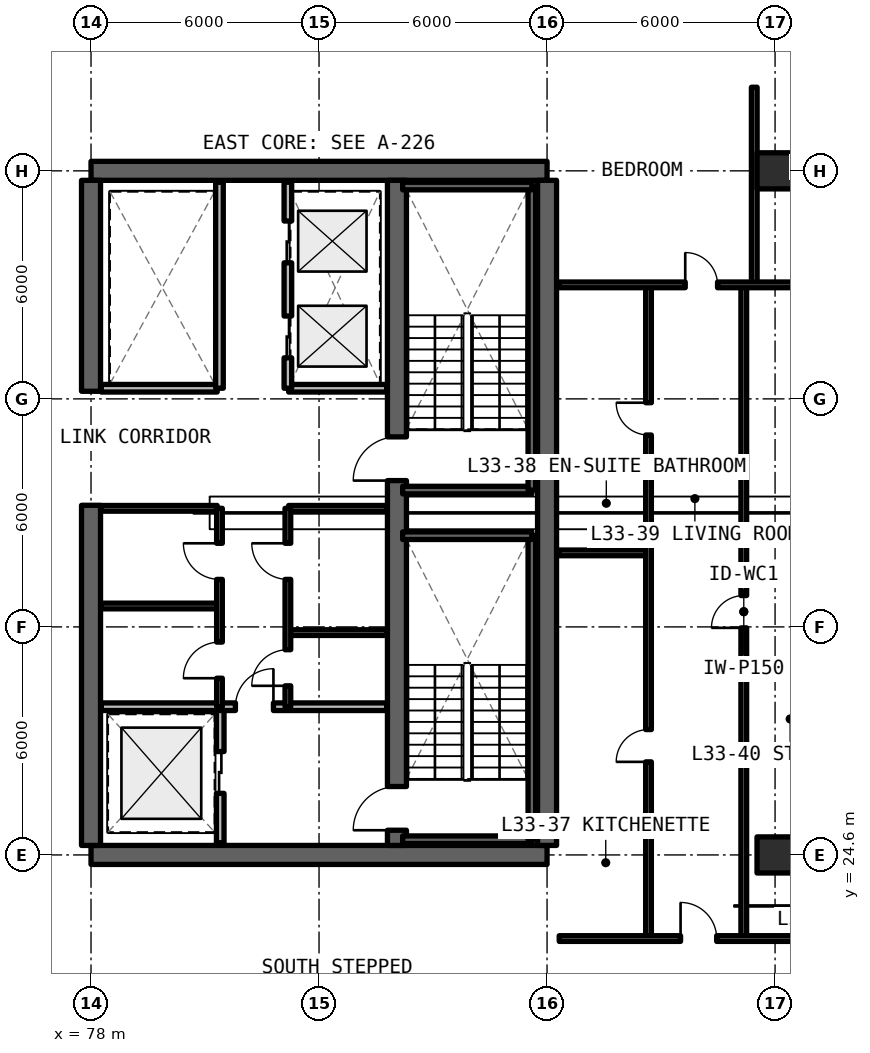
"""IFC4 building model, lengths in metres.
Left out: names, types, materials, properties, quantities, classifications, styles, units other than length and angle.
Written with IfcOpenShell. Run it as: python <this file> out.ifc"""

import sys

from ifc_helpers import new_model, si_unit, direction, frame, frame_2d, origin, origin_2d, place, context, subcontext, project, spatial, rectangle, extrude, element, fill, save


model = new_model("IFC4")
c1 = context("Model", 3, precision=1e-05, world=origin(), true_north=direction((0.0, 1.0)))
c2 = subcontext(c1, "Body", "Model", "MODEL_VIEW")
j1 = project(units=[si_unit("LENGTHUNIT", "METRE"), si_unit("PLANEANGLEUNIT", "RADIAN")], contexts=[c1])
p1 = place(None, origin())
s1 = spatial("IfcSite", under=j1, at=p1, CompositionType="ELEMENT")
p2 = place(p1, origin())
s2 = spatial("IfcBuilding", under=s1, at=p2, CompositionType="ELEMENT")
p3 = place(p2, frame((0.0, 0.0, 119.46)))
s3 = spatial("IfcBuildingStorey", under=s2, at=p3, CompositionType="ELEMENT", Elevation=119.46)
for number, where, z_axis, x_axis in (
    (1, (78.0, 24.6, 0.0), (0.0, 0.0, 1.0), (1.0, 0.0, 0.0)),
    (2, (90.0, 42.6, 0.0), (0.0, 0.0, 1.0), (-1.0, 0.0, 0.0)),
):
    element("IfcWall", number, at=place(p3, frame(where, z_axis=z_axis, x_axis=x_axis)), inside=s3, PredefinedType="SHEAR", context=c2, shape_type="SweptSolid", body=[
        extrude(rectangle(XDim=12.0, YDim=0.5, at=frame_2d((6.0, 0.0))), origin(), (0.0, 0.0, 1.0), 3.63),
    ])
p4 = place(p3, frame((90.0, 24.85, 0.0), z_axis=(0.0, 0.0, 1.0), x_axis=(0.0, 1.0, 0.0)))
e3 = element("IfcWall", 3, at=p4, inside=s3, PredefinedType="SHEAR", context=c2, shape_type="SweptSolid", body=[
    extrude(rectangle(XDim=17.5, YDim=0.5, at=frame_2d((8.75, 0.0))), origin(), (0.0, 0.0, 1.0), 3.63),
])
p5 = place(p3, frame((78.0, 24.85, 0.0), z_axis=(0.0, 0.0, 1.0), x_axis=(0.0, 1.0, 0.0)))
e4 = element("IfcWall", 4, at=p5, inside=s3, PredefinedType="SHEAR", context=c2, shape_type="SweptSolid", body=[
    extrude(rectangle(XDim=8.95, YDim=0.5, at=frame_2d((4.475, 0.0))), origin(), (0.0, 0.0, 1.0), 3.63),
])
p6 = place(p3, frame((78.0, 36.8, 0.0), z_axis=(0.0, 0.0, 1.0), x_axis=(0.0, 1.0, 0.0)))
e5 = element("IfcWall", 5, at=p6, inside=s3, PredefinedType="SHEAR", context=c2, shape_type="SweptSolid", body=[
    extrude(rectangle(XDim=5.55, YDim=0.5, at=frame_2d((2.775, 0.0))), origin(), (0.0, 0.0, 1.0), 3.63),
])
p7 = place(p3, frame((86.05, 24.85, 0.0), z_axis=(0.0, 0.0, 1.0), x_axis=(0.0, 1.0, 0.0)))
e6 = element("IfcWall", 6, at=p7, inside=s3, PredefinedType="SHEAR", context=c2, shape_type="SweptSolid", body=[
    extrude(rectangle(XDim=17.5, YDim=0.5, at=frame_2d((8.75, 0.0))), origin(), (0.0, 0.0, 1.0), 3.63),
])
p8 = place(p7, frame((0.4, 0.0, 0.0)))
e7 = element("IfcOpeningElement", 7, at=p8, cuts=e6, PredefinedType="OPENING", context=c2, shape_type="SweptSolid", body=[
    extrude(rectangle(XDim=1.15, YDim=2.15, at=frame_2d((0.575, 1.075))), frame((0.0, 0.26, 0.0), z_axis=(0.0, -1.0, 0.0), x_axis=(1.0, 0.0, 0.0)), (0.0, 0.0, 1.0), 0.52),
])
p9 = place(p7, frame((9.6, 0.0, 0.0)))
e8 = element("IfcOpeningElement", 8, at=p9, cuts=e6, PredefinedType="OPENING", context=c2, shape_type="SweptSolid", body=[
    extrude(rectangle(XDim=1.15, YDim=2.15, at=frame_2d((0.575, 1.075))), frame((0.0, 0.26, 0.0), z_axis=(0.0, -1.0, 0.0), x_axis=(1.0, 0.0, 0.0)), (0.0, 0.0, 1.0), 0.52),
])
for number, where, z_axis, x_axis in (
    (9, (96.0, 24.6, 0.0), (0.0, 0.0, 1.0), (1.0, 0.0, 0.0)),
    (10, (96.0, 42.6, 0.0), (0.0, 0.0, 1.0), (1.0, 0.0, 0.0)),
):
    element("IfcColumn", number, at=place(p3, frame(where, z_axis=z_axis, x_axis=x_axis)), inside=s3, PredefinedType="COLUMN", context=c2, shape_type="SweptSolid", body=[
        extrude(rectangle(XDim=0.95, YDim=0.95, at=origin_2d()), origin(), (0.0, 0.0, 1.0), 3.63),
    ])
p10 = place(p3, frame((81.4, 24.92, 0.0), z_axis=(0.0, 0.0, 1.0), x_axis=(0.0, 1.0, 0.0)))
e11 = element("IfcWall", 11, at=p10, inside=s3, PredefinedType="SOLIDWALL", context=c2, shape_type="SweptSolid", body=[
    extrude(rectangle(XDim=3.58, YDim=0.2, at=frame_2d((1.79, 0.0))), origin(), (0.0, 0.0, 1.0), 2.57),
])
p11 = place(p10, frame((1.3, 0.0, 0.0)))
e12 = element("IfcOpeningElement", 12, at=p11, cuts=e11, PredefinedType="OPENING", context=c2, shape_type="SweptSolid", body=[
    extrude(rectangle(XDim=1.1, YDim=2.2, at=frame_2d((0.55, 1.1))), frame((0.0, 0.11, 0.0), z_axis=(0.0, -1.0, 0.0), x_axis=(1.0, 0.0, 0.0)), (0.0, 0.0, 1.0), 0.22),
])
p12 = place(p3, frame((78.27, 28.5, 0.0), z_axis=(0.0, 0.0, 1.0), x_axis=(1.0, 0.0, 0.0)))
e13 = element("IfcWall", 13, at=p12, inside=s3, PredefinedType="SOLIDWALL", context=c2, shape_type="SweptSolid", body=[
    extrude(rectangle(XDim=7.51, YDim=0.2, at=frame_2d((3.755, 0.0))), origin(), (0.0, 0.0, 1.0), 2.57),
])
p13 = place(p12, frame((3.53, 0.0, 0.0)))
e14 = element("IfcOpeningElement", 14, at=p13, cuts=e13, PredefinedType="OPENING", context=c2, shape_type="SweptSolid", body=[
    extrude(rectangle(XDim=1.0, YDim=2.15, at=frame_2d((0.5, 1.075))), frame((0.0, 0.11, 0.0), z_axis=(0.0, -1.0, 0.0), x_axis=(1.0, 0.0, 0.0)), (0.0, 0.0, 1.0), 0.22),
])
for number, where, z_axis, x_axis in (
    (15, (83.2, 30.45, 0.0), (0.0, 0.0, 1.0), (1.0, 0.0, 0.0)),
    (16, (83.2, 33.72, 0.0), (0.0, 0.0, 1.0), (1.0, 0.0, 0.0)),
):
    element("IfcWall", number, at=place(p3, frame(where, z_axis=z_axis, x_axis=x_axis)), inside=s3, PredefinedType="SOLIDWALL", context=c2, shape_type="SweptSolid", body=[
        extrude(rectangle(XDim=2.58, YDim=0.15, at=frame_2d((1.29, 0.0))), origin(), (0.0, 0.0, 1.0), 2.57),
    ])
p14 = place(p3, frame((83.18, 28.5, 0.0), z_axis=(0.0, 0.0, 1.0), x_axis=(0.0, 1.0, 0.0)))
e17 = element("IfcWall", 17, at=p14, inside=s3, PredefinedType="SOLIDWALL", context=c2, shape_type="SweptSolid", body=[
    extrude(rectangle(XDim=5.22, YDim=0.15, at=frame_2d((2.61, 0.0))), origin(), (0.0, 0.0, 1.0), 2.57),
])
p15 = place(p14, frame((0.55, 0.0, 0.0)))
e18 = element("IfcOpeningElement", 18, at=p15, cuts=e17, PredefinedType="OPENING", context=c2, shape_type="SweptSolid", body=[
    extrude(rectangle(XDim=0.95, YDim=2.15, at=frame_2d((0.475, 1.075))), frame((0.0, 0.085, 0.0), z_axis=(0.0, -1.0, 0.0), x_axis=(1.0, 0.0, 0.0)), (0.0, 0.0, 1.0), 0.17),
])
p16 = place(p14, frame((3.35, 0.0, 0.0)))
e19 = element("IfcOpeningElement", 19, at=p16, cuts=e17, PredefinedType="OPENING", context=c2, shape_type="SweptSolid", body=[
    extrude(rectangle(XDim=0.95, YDim=2.15, at=frame_2d((0.475, 1.075))), frame((0.0, 0.085, 0.0), z_axis=(0.0, -1.0, 0.0), x_axis=(1.0, 0.0, 0.0)), (0.0, 0.0, 1.0), 0.17),
])
for number, where, z_axis, x_axis in (
    (20, (78.27, 31.15, 0.0), (0.0, 0.0, 1.0), (1.0, 0.0, 0.0)),
    (21, (78.27, 33.72, 0.0), (0.0, 0.0, 1.0), (1.0, 0.0, 0.0)),
):
    element("IfcWall", number, at=place(p3, frame(where, z_axis=z_axis, x_axis=x_axis)), inside=s3, PredefinedType="SOLIDWALL", context=c2, shape_type="SweptSolid", body=[
        extrude(rectangle(XDim=3.05, YDim=0.15, at=frame_2d((1.525, 0.0))), origin(), (0.0, 0.0, 1.0), 2.57),
    ])
p17 = place(p3, frame((81.38, 28.5, 0.0), z_axis=(0.0, 0.0, 1.0), x_axis=(0.0, 1.0, 0.0)))
e22 = element("IfcWall", 22, at=p17, inside=s3, PredefinedType="SOLIDWALL", context=c2, shape_type="SweptSolid", body=[
    extrude(rectangle(XDim=5.22, YDim=0.15, at=frame_2d((2.61, 0.0))), origin(), (0.0, 0.0, 1.0), 2.57),
])
p18 = place(p17, frame((0.75, 0.0, 0.0)))
e23 = element("IfcOpeningElement", 23, at=p18, cuts=e22, PredefinedType="OPENING", context=c2, shape_type="SweptSolid", body=[
    extrude(rectangle(XDim=0.95, YDim=2.15, at=frame_2d((0.475, 1.075))), frame((0.0, 0.085, 0.0), z_axis=(0.0, -1.0, 0.0), x_axis=(1.0, 0.0, 0.0)), (0.0, 0.0, 1.0), 0.17),
])
p19 = place(p17, frame((3.35, 0.0, 0.0)))
e24 = element("IfcOpeningElement", 24, at=p19, cuts=e22, PredefinedType="OPENING", context=c2, shape_type="SweptSolid", body=[
    extrude(rectangle(XDim=0.95, YDim=2.15, at=frame_2d((0.475, 1.075))), frame((0.0, 0.085, 0.0), z_axis=(0.0, -1.0, 0.0), x_axis=(1.0, 0.0, 0.0)), (0.0, 0.0, 1.0), 0.17),
])
p20 = place(p3, frame((83.2, 36.88, 0.0), z_axis=(0.0, 0.0, 1.0), x_axis=(1.0, 0.0, 0.0)))
e25 = element("IfcWall", 25, at=p20, inside=s3, PredefinedType="SOLIDWALL", context=c2, shape_type="SweptSolid", body=[
    extrude(rectangle(XDim=2.58, YDim=0.2, at=frame_2d((1.29, 0.0))), origin(), (0.0, 0.0, 1.0), 2.57),
])
p21 = place(p3, frame((83.18, 36.88, 0.0), z_axis=(0.0, 0.0, 1.0), x_axis=(0.0, 1.0, 0.0)))
e26 = element("IfcWall", 26, at=p21, inside=s3, PredefinedType="SOLIDWALL", context=c2, shape_type="SweptSolid", body=[
    extrude(rectangle(XDim=5.42, YDim=0.2, at=frame_2d((2.71, 0.0))), origin(), (0.0, 0.0, 1.0), 2.57),
])
p22 = place(p21, frame((0.8, 0.0, 0.0)))
e27 = element("IfcOpeningElement", 27, at=p22, cuts=e26, PredefinedType="OPENING", context=c2, shape_type="SweptSolid", body=[
    extrude(rectangle(XDim=1.1, YDim=2.2, at=frame_2d((0.55, 1.1))), frame((0.0, 0.11, 0.0), z_axis=(0.0, -1.0, 0.0), x_axis=(1.0, 0.0, 0.0)), (0.0, 0.0, 1.0), 0.22),
])
p23 = place(p21, frame((3.3, 0.0, 0.0)))
e28 = element("IfcOpeningElement", 28, at=p23, cuts=e26, PredefinedType="OPENING", context=c2, shape_type="SweptSolid", body=[
    extrude(rectangle(XDim=1.1, YDim=2.2, at=frame_2d((0.55, 1.1))), frame((0.0, 0.11, 0.0), z_axis=(0.0, -1.0, 0.0), x_axis=(1.0, 0.0, 0.0)), (0.0, 0.0, 1.0), 0.22),
])
p24 = place(p3, frame((78.27, 36.88, 0.0), z_axis=(0.0, 0.0, 1.0), x_axis=(1.0, 0.0, 0.0)))
e29 = element("IfcWall", 29, at=p24, inside=s3, PredefinedType="SOLIDWALL", context=c2, shape_type="SweptSolid", body=[
    extrude(rectangle(XDim=3.05, YDim=0.2, at=frame_2d((1.525, 0.0))), origin(), (0.0, 0.0, 1.0), 2.57),
])
p25 = place(p3, frame((81.38, 36.88, 0.0), z_axis=(0.0, 0.0, 1.0), x_axis=(0.0, 1.0, 0.0)))
e30 = element("IfcWall", 30, at=p25, inside=s3, PredefinedType="SOLIDWALL", context=c2, shape_type="SweptSolid", body=[
    extrude(rectangle(XDim=5.42, YDim=0.2, at=frame_2d((2.71, 0.0))), origin(), (0.0, 0.0, 1.0), 2.57),
])
p26 = place(p3, frame((95.177, 22.4, 0.0), z_axis=(0.0, 0.0, 1.0), x_axis=(0.0, 1.0, 0.0)))
e31 = element("IfcWall", 31, at=p26, inside=s3, PredefinedType="PARTITIONING", context=c2, shape_type="SweptSolid", body=[
    extrude(rectangle(XDim=17.2, YDim=0.15, at=frame_2d((8.6, 0.0))), origin(), (0.0, 0.0, 1.0), 2.57),
])
p27 = place(p26, frame((8.175, 0.0, 0.0)))
e32 = element("IfcOpeningElement", 32, at=p27, cuts=e31, PredefinedType="OPENING", context=c2, shape_type="SweptSolid", body=[
    extrude(rectangle(XDim=0.85, YDim=2.1, at=frame_2d((0.425, 1.05))), frame((0.0, 0.085, 0.0), z_axis=(0.0, -1.0, 0.0), x_axis=(1.0, 0.0, 0.0)), (0.0, 0.0, 1.0), 0.17),
])
p28 = place(p3, frame((90.32, 32.548, 0.0), z_axis=(0.0, 0.0, 1.0), x_axis=(1.0, 0.0, 0.0)))
e33 = element("IfcWall", 33, at=p28, inside=s3, PredefinedType="PARTITIONING", context=c2, shape_type="SweptSolid", body=[
    extrude(rectangle(XDim=2.35, YDim=0.15, at=frame_2d((1.175, 0.0))), origin(), (0.0, 0.0, 1.0), 2.57),
])
p29 = place(p3, frame((92.67, 22.4, 0.0), z_axis=(0.0, 0.0, 1.0), x_axis=(0.0, 1.0, 0.0)))
e34 = element("IfcWall", 34, at=p29, inside=s3, PredefinedType="PARTITIONING", context=c2, shape_type="SweptSolid", body=[
    extrude(rectangle(XDim=17.2, YDim=0.15, at=frame_2d((8.6, 0.0))), origin(), (0.0, 0.0, 1.0), 2.57),
])
p30 = place(p29, frame((4.649, 0.0, 0.0)))
e35 = element("IfcOpeningElement", 35, at=p30, cuts=e34, PredefinedType="OPENING", context=c2, shape_type="SweptSolid", body=[
    extrude(rectangle(XDim=0.85, YDim=2.1, at=frame_2d((0.425, 1.05))), frame((0.0, 0.085, 0.0), z_axis=(0.0, -1.0, 0.0), x_axis=(1.0, 0.0, 0.0)), (0.0, 0.0, 1.0), 0.17),
])
p31 = place(p29, frame((13.249, 0.0, 0.0)))
e36 = element("IfcOpeningElement", 36, at=p31, cuts=e34, PredefinedType="OPENING", context=c2, shape_type="SweptSolid", body=[
    extrude(rectangle(XDim=0.85, YDim=2.1, at=frame_2d((0.425, 1.05))), frame((0.0, 0.085, 0.0), z_axis=(0.0, -1.0, 0.0), x_axis=(1.0, 0.0, 0.0)), (0.0, 0.0, 1.0), 0.17),
])
p32 = place(p3, frame((95.452, 39.6, 0.0), z_axis=(0.0, 0.0, 1.0), x_axis=(0.0, 1.0, 0.0)))
e37 = element("IfcWall", 37, at=p32, inside=s3, PredefinedType="PARTITIONING", context=c2, shape_type="SweptSolid", body=[
    extrude(rectangle(XDim=5.2, YDim=0.15, at=frame_2d((2.6, 0.0))), origin(), (0.0, 0.0, 1.0), 2.57),
])
p33 = place(p3, frame((90.32, 39.6, 0.0), z_axis=(0.0, 0.0, 1.0), x_axis=(1.0, 0.0, 0.0)))
e38 = element("IfcWall", 38, at=p33, inside=s3, PredefinedType="PARTITIONING", context=c2, shape_type="SweptSolid", body=[
    extrude(rectangle(XDim=9.87, YDim=0.15, at=frame_2d((4.935, 0.0))), origin(), (0.0, 0.0, 1.0), 2.57),
])
p34 = place(p33, frame((3.316, 0.0, 0.0)))
e39 = element("IfcOpeningElement", 39, at=p34, cuts=e38, PredefinedType="OPENING", context=c2, shape_type="SweptSolid", body=[
    extrude(rectangle(XDim=0.85, YDim=2.1, at=frame_2d((0.425, 1.05))), frame((0.0, 0.085, 0.0), z_axis=(0.0, -1.0, 0.0), x_axis=(1.0, 0.0, 0.0)), (0.0, 0.0, 1.0), 0.17),
])
p35 = place(p33, frame((7.876, 0.0, 0.0)))
e40 = element("IfcOpeningElement", 40, at=p35, cuts=e38, PredefinedType="OPENING", context=c2, shape_type="SweptSolid", body=[
    extrude(rectangle(XDim=0.85, YDim=2.1, at=frame_2d((0.425, 1.05))), frame((0.0, 0.085, 0.0), z_axis=(0.0, -1.0, 0.0), x_axis=(1.0, 0.0, 0.0)), (0.0, 0.0, 1.0), 0.17),
])
p36 = place(p3, frame((90.32, 22.4, 0.0), z_axis=(0.0, 0.0, 1.0), x_axis=(1.0, 0.0, 0.0)))
e41 = element("IfcWall", 41, at=p36, inside=s3, PredefinedType="SOLIDWALL", context=c2, shape_type="SweptSolid", body=[
    extrude(rectangle(XDim=9.87, YDim=0.15, at=frame_2d((4.935, 0.0))), origin(), (0.0, 0.0, 1.0), 2.57),
])
p37 = place(p36, frame((3.193, 0.0, 0.0)))
e42 = element("IfcOpeningElement", 42, at=p37, cuts=e41, PredefinedType="OPENING", context=c2, shape_type="SweptSolid", body=[
    extrude(rectangle(XDim=0.95, YDim=2.15, at=frame_2d((0.475, 1.075))), frame((0.0, 0.085, 0.0), z_axis=(0.0, -1.0, 0.0), x_axis=(1.0, 0.0, 0.0)), (0.0, 0.0, 1.0), 0.17),
])
p38 = place(p3, frame((86.2, 25.0, 0.0), z_axis=(0.0, 0.0, 1.0), x_axis=(1.0, 0.0, 0.0)))
e43 = element("IfcWall", 43, at=p38, inside=s3, PredefinedType="SOLIDWALL", context=c2, shape_type="SweptSolid", body=[
    extrude(rectangle(XDim=3.4, YDim=0.2, at=frame_2d((1.7, 0.0))), origin(), (0.0, 0.0, 1.0), 3.63),
])
p39 = place(p3, frame((89.6, 25.0, 0.0), z_axis=(0.0, 0.0, 1.0), x_axis=(0.0, 1.0, 0.0)))
e44 = element("IfcWall", 44, at=p39, inside=s3, PredefinedType="SOLIDWALL", context=c2, shape_type="SweptSolid", body=[
    extrude(rectangle(XDim=8.0, YDim=0.2, at=frame_2d((4.0, 0.0))), origin(), (0.0, 0.0, 1.0), 3.63),
])
for number, where, z_axis, x_axis in (
    (45, (89.6, 33.0, 0.0), (0.0, 0.0, 1.0), (-1.0, 0.0, 0.0)),
    (46, (86.2, 34.2, 0.0), (0.0, 0.0, 1.0), (1.0, 0.0, 0.0)),
):
    element("IfcWall", number, at=place(p3, frame(where, z_axis=z_axis, x_axis=x_axis)), inside=s3, PredefinedType="SOLIDWALL", context=c2, shape_type="SweptSolid", body=[
        extrude(rectangle(XDim=3.4, YDim=0.2, at=frame_2d((1.7, 0.0))), origin(), (0.0, 0.0, 1.0), 3.63),
    ])
p40 = place(p3, frame((89.6, 34.2, 0.0), z_axis=(0.0, 0.0, 1.0), x_axis=(0.0, 1.0, 0.0)))
e47 = element("IfcWall", 47, at=p40, inside=s3, PredefinedType="SOLIDWALL", context=c2, shape_type="SweptSolid", body=[
    extrude(rectangle(XDim=8.0, YDim=0.2, at=frame_2d((4.0, 0.0))), origin(), (0.0, 0.0, 1.0), 3.63),
])
p41 = place(p3, frame((89.6, 42.2, 0.0), z_axis=(0.0, 0.0, 1.0), x_axis=(-1.0, 0.0, 0.0)))
e48 = element("IfcWall", 48, at=p41, inside=s3, PredefinedType="SOLIDWALL", context=c2, shape_type="SweptSolid", body=[
    extrude(rectangle(XDim=3.4, YDim=0.2, at=frame_2d((1.7, 0.0))), origin(), (0.0, 0.0, 1.0), 3.63),
])
p42 = place(p11, origin())
e49 = element("IfcDoor", 49, at=p42, inside=s3, OperationType="SLIDING_TO_LEFT", PredefinedType="DOOR", context=c2, shape_type="SweptSolid", body=[
    extrude(rectangle(XDim=1.1, YDim=2.2, at=frame_2d((0.55, 1.1))), frame((0.0, 0.025, 0.0), z_axis=(0.0, -1.0, 0.0), x_axis=(1.0, 0.0, 0.0)), (0.0, 0.0, 1.0), 0.05),
])
fill(e12, e49)
p43 = place(p13, origin())
e50 = element("IfcDoor", 50, at=p43, inside=s3, OperationType="SINGLE_SWING_RIGHT", PredefinedType="DOOR", context=c2, shape_type="SweptSolid", body=[
    extrude(rectangle(XDim=1.0, YDim=2.15, at=frame_2d((0.5, 1.075))), frame((0.0, 0.025, 0.0), z_axis=(0.0, -1.0, 0.0), x_axis=(1.0, 0.0, 0.0)), (0.0, 0.0, 1.0), 0.05),
])
fill(e14, e50)
p44 = place(p15, origin())
e51 = element("IfcDoor", 51, at=p44, inside=s3, OperationType="SINGLE_SWING_LEFT", PredefinedType="DOOR", context=c2, shape_type="SweptSolid", body=[
    extrude(rectangle(XDim=0.95, YDim=2.15, at=frame_2d((0.475, 1.075))), frame((0.0, 0.025, 0.0), z_axis=(0.0, -1.0, 0.0), x_axis=(1.0, 0.0, 0.0)), (0.0, 0.0, 1.0), 0.05),
])
fill(e18, e51)
p45 = place(p16, origin())
e52 = element("IfcDoor", 52, at=p45, inside=s3, OperationType="SINGLE_SWING_RIGHT", PredefinedType="DOOR", context=c2, shape_type="SweptSolid", body=[
    extrude(rectangle(XDim=0.95, YDim=2.15, at=frame_2d((0.475, 1.075))), frame((0.0, 0.025, 0.0), z_axis=(0.0, -1.0, 0.0), x_axis=(1.0, 0.0, 0.0)), (0.0, 0.0, 1.0), 0.05),
])
fill(e19, e52)
p46 = place(p18, origin())
e53 = element("IfcDoor", 53, at=p46, inside=s3, OperationType="SINGLE_SWING_LEFT", PredefinedType="DOOR", context=c2, shape_type="SweptSolid", body=[
    extrude(rectangle(XDim=0.95, YDim=2.15, at=frame_2d((0.475, 1.075))), frame((0.0, 0.025, 0.0), z_axis=(0.0, -1.0, 0.0), x_axis=(1.0, 0.0, 0.0)), (0.0, 0.0, 1.0), 0.05),
])
fill(e23, e53)
p47 = place(p19, origin())
e54 = element("IfcDoor", 54, at=p47, inside=s3, OperationType="SINGLE_SWING_RIGHT", PredefinedType="DOOR", context=c2, shape_type="SweptSolid", body=[
    extrude(rectangle(XDim=0.95, YDim=2.15, at=frame_2d((0.475, 1.075))), frame((0.0, 0.025, 0.0), z_axis=(0.0, -1.0, 0.0), x_axis=(1.0, 0.0, 0.0)), (0.0, 0.0, 1.0), 0.05),
])
fill(e24, e54)
p48 = place(p22, origin())
e55 = element("IfcDoor", 55, at=p48, inside=s3, OperationType="SLIDING_TO_LEFT", PredefinedType="DOOR", context=c2, shape_type="SweptSolid", body=[
    extrude(rectangle(XDim=1.1, YDim=2.2, at=frame_2d((0.55, 1.1))), frame((0.0, 0.025, 0.0), z_axis=(0.0, -1.0, 0.0), x_axis=(1.0, 0.0, 0.0)), (0.0, 0.0, 1.0), 0.05),
])
fill(e27, e55)
p49 = place(p23, origin())
e56 = element("IfcDoor", 56, at=p49, inside=s3, OperationType="SLIDING_TO_RIGHT", PredefinedType="DOOR", context=c2, shape_type="SweptSolid", body=[
    extrude(rectangle(XDim=1.1, YDim=2.2, at=frame_2d((0.55, 1.1))), frame((0.0, 0.025, 0.0), z_axis=(0.0, -1.0, 0.0), x_axis=(1.0, 0.0, 0.0)), (0.0, 0.0, 1.0), 0.05),
])
fill(e28, e56)
p50 = place(p27, origin())
e57 = element("IfcDoor", 57, at=p50, inside=s3, OperationType="SINGLE_SWING_LEFT", PredefinedType="DOOR", context=c2, shape_type="SweptSolid", body=[
    extrude(rectangle(XDim=0.85, YDim=2.1, at=frame_2d((0.425, 1.05))), frame((0.0, 0.025, 0.0), z_axis=(0.0, -1.0, 0.0), x_axis=(1.0, 0.0, 0.0)), (0.0, 0.0, 1.0), 0.05),
])
fill(e32, e57)
p51 = place(p30, origin())
e58 = element("IfcDoor", 58, at=p51, inside=s3, OperationType="SINGLE_SWING_LEFT", PredefinedType="DOOR", context=c2, shape_type="SweptSolid", body=[
    extrude(rectangle(XDim=0.85, YDim=2.1, at=frame_2d((0.425, 1.05))), frame((0.0, 0.025, 0.0), z_axis=(0.0, -1.0, 0.0), x_axis=(1.0, 0.0, 0.0)), (0.0, 0.0, 1.0), 0.05),
])
fill(e35, e58)
p52 = place(p31, origin())
e59 = element("IfcDoor", 59, at=p52, inside=s3, OperationType="SINGLE_SWING_RIGHT", PredefinedType="DOOR", context=c2, shape_type="SweptSolid", body=[
    extrude(rectangle(XDim=0.85, YDim=2.1, at=frame_2d((0.425, 1.05))), frame((0.0, 0.025, 0.0), z_axis=(0.0, -1.0, 0.0), x_axis=(1.0, 0.0, 0.0)), (0.0, 0.0, 1.0), 0.05),
])
fill(e36, e59)
p53 = place(p34, origin())
e60 = element("IfcDoor", 60, at=p53, inside=s3, OperationType="SINGLE_SWING_LEFT", PredefinedType="DOOR", context=c2, shape_type="SweptSolid", body=[
    extrude(rectangle(XDim=0.85, YDim=2.1, at=frame_2d((0.425, 1.05))), frame((0.0, 0.025, 0.0), z_axis=(0.0, -1.0, 0.0), x_axis=(1.0, 0.0, 0.0)), (0.0, 0.0, 1.0), 0.05),
])
fill(e39, e60)
p54 = place(p37, origin())
e61 = element("IfcDoor", 61, at=p54, inside=s3, OperationType="SINGLE_SWING_LEFT", PredefinedType="DOOR", context=c2, shape_type="SweptSolid", body=[
    extrude(rectangle(XDim=0.95, YDim=2.15, at=frame_2d((0.475, 1.075))), frame((0.0, 0.025, 0.0), z_axis=(0.0, -1.0, 0.0), x_axis=(1.0, 0.0, 0.0)), (0.0, 0.0, 1.0), 0.05),
])
fill(e42, e61)
p55 = place(p8, origin())
e62 = element("IfcDoor", 62, at=p55, inside=s3, OperationType="SINGLE_SWING_RIGHT", PredefinedType="DOOR", context=c2, shape_type="SweptSolid", body=[
    extrude(rectangle(XDim=1.15, YDim=2.15, at=frame_2d((0.575, 1.075))), frame((0.0, 0.025, 0.0), z_axis=(0.0, -1.0, 0.0), x_axis=(1.0, 0.0, 0.0)), (0.0, 0.0, 1.0), 0.05),
])
fill(e7, e62)
p56 = place(p9, origin())
e63 = element("IfcDoor", 63, at=p56, inside=s3, OperationType="SINGLE_SWING_LEFT", PredefinedType="DOOR", context=c2, shape_type="SweptSolid", body=[
    extrude(rectangle(XDim=1.15, YDim=2.15, at=frame_2d((0.575, 1.075))), frame((0.0, 0.025, 0.0), z_axis=(0.0, -1.0, 0.0), x_axis=(1.0, 0.0, 0.0)), (0.0, 0.0, 1.0), 0.05),
])
fill(e8, e63)
save(model, sys.argv[1])
